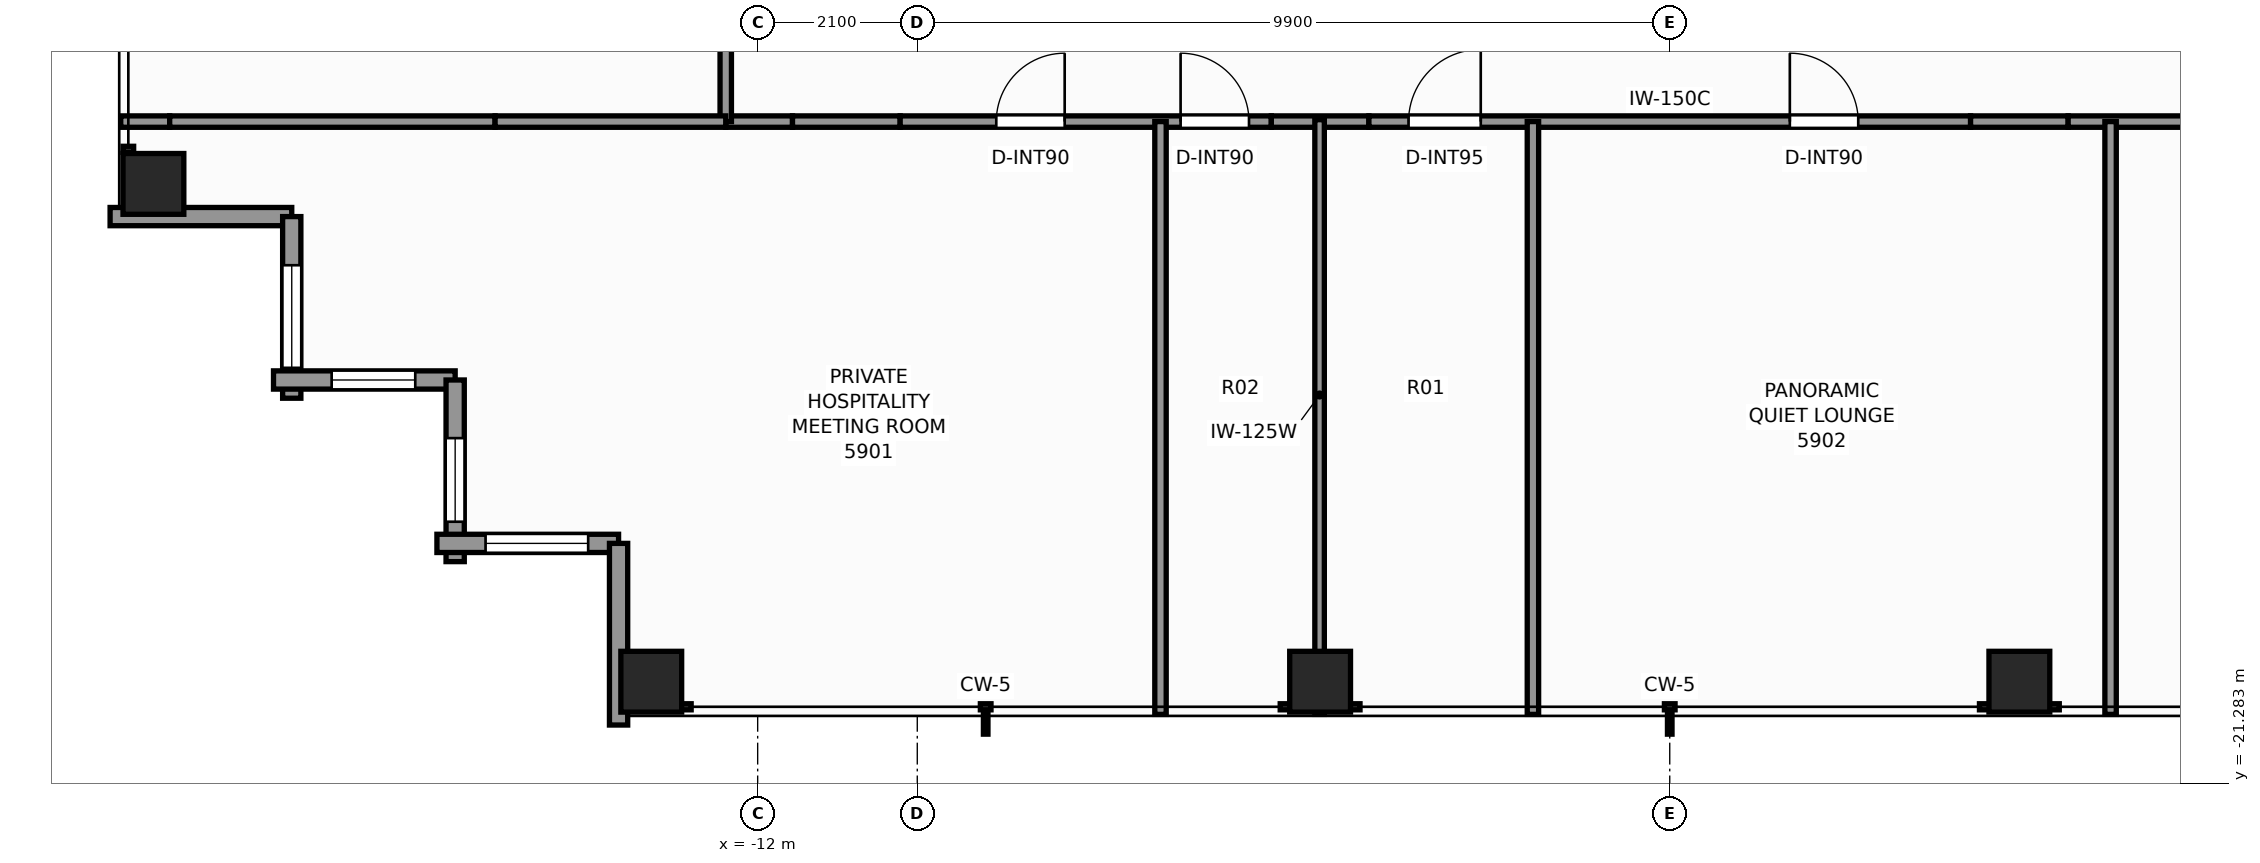
"""IFC4 building model, lengths in metres.
Left out: names, types, materials, properties, quantities, classifications, styles, units other than length and angle.
Written with IfcOpenShell. Run it as: python <this file> out.ifc"""

import sys

from ifc_helpers import new_model, si_unit, direction, frame, frame_2d, origin, origin_2d, place, context, subcontext, project, spatial, rectangle, extrude, element, fill, save


model = new_model("IFC4")
c1 = context("Model", 3, precision=1e-05, world=origin(), true_north=direction((0.0, 1.0)))
c2 = subcontext(c1, "Body", "Model", "MODEL_VIEW")
j1 = project(units=[si_unit("LENGTHUNIT", "METRE"), si_unit("PLANEANGLEUNIT", "RADIAN")], contexts=[c1])
p1 = place(None, origin())
s1 = spatial("IfcSite", under=j1, at=p1, CompositionType="ELEMENT")
p2 = place(p1, origin())
s2 = spatial("IfcBuilding", under=s1, at=p2, CompositionType="ELEMENT")
p3 = place(p2, frame((0.0, 0.0, 203.1)))
s3 = spatial("IfcBuildingStorey", under=s2, at=p3, CompositionType="ELEMENT", Elevation=203.1)
for number, where, z_axis, x_axis in (
    (1, (-13.4, -19.95, 0.0), (0.0, 0.0, 1.0), (1.0, 0.0, 0.0)),
    (2, (-4.6, -19.95, 0.0), (0.0, 0.0, 1.0), (1.0, 0.0, 0.0)),
    (3, (4.6, -19.95, 0.0), (0.0, 0.0, 1.0), (1.0, 0.0, 0.0)),
    (4, (-19.95, -13.4, 0.0), (0.0, 0.0, 1.0), (1.0, 0.0, 0.0)),
):
    element("IfcColumn", number, at=place(p3, frame(where, z_axis=z_axis, x_axis=x_axis)), inside=s3, PredefinedType="COLUMN", context=c2, shape_type="SweptSolid", body=[
        extrude(rectangle(XDim=0.8, YDim=0.8, at=origin_2d()), origin(), (0.0, 0.0, 1.0), 3.3),
    ])
p4 = place(p3, frame((-18.13, -13.83, 0.0), z_axis=(0.0, 0.0, 1.0), x_axis=(-1.0, 0.0, 0.0)))
e5 = element("IfcWall", 5, at=p4, inside=s3, PredefinedType="STANDARD", context=c2, shape_type="SweptSolid", body=[
    extrude(rectangle(XDim=2.39, YDim=0.24, at=frame_2d((1.195, 0.0))), origin(), (0.0, 0.0, 1.0), 1.275),
])
p5 = place(p3, frame((-18.13, -16.22, 0.0), z_axis=(0.0, 0.0, 1.0), x_axis=(0.0, 1.0, 0.0)))
e6 = element("IfcWall", 6, at=p5, inside=s3, PredefinedType="STANDARD", context=c2, shape_type="SweptSolid", body=[
    extrude(rectangle(XDim=2.39, YDim=0.24, at=frame_2d((1.195, 0.0))), origin(), (0.0, 0.0, 1.0), 2.463),
])
p6 = place(p5, frame((0.4, 0.0, 0.65)))
e7 = element("IfcOpeningElement", 7, at=p6, cuts=e6, PredefinedType="OPENING", context=c2, shape_type="SweptSolid", body=[
    extrude(rectangle(XDim=1.35, YDim=1.55, at=frame_2d((0.675, 0.775))), frame((0.0, 0.13, 0.0), z_axis=(0.0, -1.0, 0.0), x_axis=(1.0, 0.0, 0.0)), (0.0, 0.0, 1.0), 0.26),
])
p7 = place(p3, frame((-15.98, -15.98, 0.0), z_axis=(0.0, 0.0, 1.0), x_axis=(-1.0, 0.0, 0.0)))
e8 = element("IfcWall", 8, at=p7, inside=s3, PredefinedType="STANDARD", context=c2, shape_type="SweptSolid", body=[
    extrude(rectangle(XDim=2.39, YDim=0.24, at=frame_2d((1.195, 0.0))), origin(), (0.0, 0.0, 1.0), 2.463),
])
p8 = place(p7, frame((0.525, 0.0, 0.65)))
e9 = element("IfcOpeningElement", 9, at=p8, cuts=e8, PredefinedType="OPENING", context=c2, shape_type="SweptSolid", body=[
    extrude(rectangle(XDim=1.1, YDim=1.45, at=frame_2d((0.55, 0.725))), frame((0.0, 0.13, 0.0), z_axis=(0.0, -1.0, 0.0), x_axis=(1.0, 0.0, 0.0)), (0.0, 0.0, 1.0), 0.26),
])
p9 = place(p3, frame((-15.98, -18.37, 0.0), z_axis=(0.0, 0.0, 1.0), x_axis=(0.0, 1.0, 0.0)))
e10 = element("IfcWall", 10, at=p9, inside=s3, PredefinedType="STANDARD", context=c2, shape_type="SweptSolid", body=[
    extrude(rectangle(XDim=2.39, YDim=0.24, at=frame_2d((1.195, 0.0))), origin(), (0.0, 0.0, 1.0), 2.463),
])
p10 = place(p9, frame((0.525, 0.0, 0.65)))
e11 = element("IfcOpeningElement", 11, at=p10, cuts=e10, PredefinedType="OPENING", context=c2, shape_type="SweptSolid", body=[
    extrude(rectangle(XDim=1.1, YDim=1.45, at=frame_2d((0.55, 0.725))), frame((0.0, 0.13, 0.0), z_axis=(0.0, -1.0, 0.0), x_axis=(1.0, 0.0, 0.0)), (0.0, 0.0, 1.0), 0.26),
])
p11 = place(p3, frame((-13.83, -18.13, 0.0), z_axis=(0.0, 0.0, 1.0), x_axis=(-1.0, 0.0, 0.0)))
e12 = element("IfcWall", 12, at=p11, inside=s3, PredefinedType="STANDARD", context=c2, shape_type="SweptSolid", body=[
    extrude(rectangle(XDim=2.39, YDim=0.24, at=frame_2d((1.195, 0.0))), origin(), (0.0, 0.0, 1.0), 2.463),
])
p12 = place(p11, frame((0.4, 0.0, 0.65)))
e13 = element("IfcOpeningElement", 13, at=p12, cuts=e12, PredefinedType="OPENING", context=c2, shape_type="SweptSolid", body=[
    extrude(rectangle(XDim=1.35, YDim=1.55, at=frame_2d((0.675, 0.775))), frame((0.0, 0.13, 0.0), z_axis=(0.0, -1.0, 0.0), x_axis=(1.0, 0.0, 0.0)), (0.0, 0.0, 1.0), 0.26),
])
p13 = place(p3, frame((-13.83, -20.52, 0.0), z_axis=(0.0, 0.0, 1.0), x_axis=(0.0, 1.0, 0.0)))
e14 = element("IfcWall", 14, at=p13, inside=s3, PredefinedType="STANDARD", context=c2, shape_type="SweptSolid", body=[
    extrude(rectangle(XDim=2.39, YDim=0.24, at=frame_2d((1.195, 0.0))), origin(), (0.0, 0.0, 1.0), 1.275),
])
p14 = place(p3, frame((-12.42, -12.58, 0.0), z_axis=(0.0, 0.0, 1.0), x_axis=(1.0, 0.0, 0.0)))
e15 = element("IfcWall", 15, at=p14, inside=s3, PredefinedType="PARTITIONING", context=c2, shape_type="SweptSolid", body=[
    extrude(rectangle(XDim=0.878, YDim=0.15, at=frame_2d((0.439, 0.0))), origin(), (0.0, 0.0, 1.0), 3.08),
])
p15 = place(p3, frame((-11.542, -12.58, 0.0), z_axis=(0.0, 0.0, 1.0), x_axis=(1.0, 0.0, 0.0)))
e16 = element("IfcWall", 16, at=p15, inside=s3, PredefinedType="PARTITIONING", context=c2, shape_type="SweptSolid", body=[
    extrude(rectangle(XDim=1.417, YDim=0.15, at=frame_2d((0.708, 0.0))), origin(), (0.0, 0.0, 1.0), 1.265),
])
p16 = place(p3, frame((-10.125, -12.58, 0.0), z_axis=(0.0, 0.0, 1.0), x_axis=(1.0, 0.0, 0.0)))
e17 = element("IfcWall", 17, at=p16, inside=s3, PredefinedType="PARTITIONING", context=c2, shape_type="SweptSolid", body=[
    extrude(rectangle(XDim=4.883, YDim=0.15, at=frame_2d((2.441, 0.0))), origin(), (0.0, 0.0, 1.0), 3.08),
])
p17 = place(p16, frame((1.264, 0.0, 0.0)))
e18 = element("IfcOpeningElement", 18, at=p17, cuts=e17, PredefinedType="OPENING", context=c2, shape_type="SweptSolid", body=[
    extrude(rectangle(XDim=0.9, YDim=2.06, at=frame_2d((0.45, 1.03))), frame((0.0, 0.085, 0.0), z_axis=(0.0, -1.0, 0.0), x_axis=(1.0, 0.0, 0.0)), (0.0, 0.0, 1.0), 0.17),
])
p18 = place(p16, frame((3.689, 0.0, 0.0)))
e19 = element("IfcOpeningElement", 19, at=p18, cuts=e17, PredefinedType="OPENING", context=c2, shape_type="SweptSolid", body=[
    extrude(rectangle(XDim=0.9, YDim=2.06, at=frame_2d((0.45, 1.03))), frame((0.0, 0.085, 0.0), z_axis=(0.0, -1.0, 0.0), x_axis=(1.0, 0.0, 0.0)), (0.0, 0.0, 1.0), 0.17),
])
p19 = place(p3, frame((-5.242, -12.58, 0.0), z_axis=(0.0, 0.0, 1.0), x_axis=(1.0, 0.0, 0.0)))
e20 = element("IfcWall", 20, at=p19, inside=s3, PredefinedType="PARTITIONING", context=c2, shape_type="SweptSolid", body=[
    extrude(rectangle(XDim=1.284, YDim=0.15, at=frame_2d((0.642, 0.0))), origin(), (0.0, 0.0, 1.0), 1.265),
])
p20 = place(p3, frame((-3.958, -12.58, 0.0), z_axis=(0.0, 0.0, 1.0), x_axis=(1.0, 0.0, 0.0)))
e21 = element("IfcWall", 21, at=p20, inside=s3, PredefinedType="PARTITIONING", context=c2, shape_type="SweptSolid", body=[
    extrude(rectangle(XDim=7.916, YDim=0.15, at=frame_2d((3.958, 0.0))), origin(), (0.0, 0.0, 1.0), 2.369),
])
p21 = place(p20, frame((0.521, 0.0, 0.0)))
e22 = element("IfcOpeningElement", 22, at=p21, cuts=e21, PredefinedType="OPENING", context=c2, shape_type="SweptSolid", body=[
    extrude(rectangle(XDim=0.95, YDim=2.06, at=frame_2d((0.475, 1.03))), frame((0.0, 0.085, 0.0), z_axis=(0.0, -1.0, 0.0), x_axis=(1.0, 0.0, 0.0)), (0.0, 0.0, 1.0), 0.17),
])
p22 = place(p20, frame((5.538, 0.0, 0.0)))
e23 = element("IfcOpeningElement", 23, at=p22, cuts=e21, PredefinedType="OPENING", context=c2, shape_type="SweptSolid", body=[
    extrude(rectangle(XDim=0.9, YDim=2.06, at=frame_2d((0.45, 1.03))), frame((0.0, 0.085, 0.0), z_axis=(0.0, -1.0, 0.0), x_axis=(1.0, 0.0, 0.0)), (0.0, 0.0, 1.0), 0.17),
])
p23 = place(p3, frame((3.958, -12.58, 0.0), z_axis=(0.0, 0.0, 1.0), x_axis=(1.0, 0.0, 0.0)))
e24 = element("IfcWall", 24, at=p23, inside=s3, PredefinedType="PARTITIONING", context=c2, shape_type="SweptSolid", body=[
    extrude(rectangle(XDim=1.284, YDim=0.15, at=frame_2d((0.642, 0.0))), origin(), (0.0, 0.0, 1.0), 1.265),
])
p24 = place(p3, frame((5.242, -12.58, 0.0), z_axis=(0.0, 0.0, 1.0), x_axis=(1.0, 0.0, 0.0)))
e25 = element("IfcWall", 25, at=p24, inside=s3, PredefinedType="PARTITIONING", context=c2, shape_type="SweptSolid", body=[
    extrude(rectangle(XDim=4.883, YDim=0.15, at=frame_2d((2.441, 0.0))), origin(), (0.0, 0.0, 1.0), 3.08),
])
p25 = place(p24, frame((2.017, 0.0, 0.0)))
e26 = element("IfcOpeningElement", 26, at=p25, cuts=e25, PredefinedType="OPENING", context=c2, shape_type="SweptSolid", body=[
    extrude(rectangle(XDim=0.9, YDim=2.06, at=frame_2d((0.45, 1.03))), frame((0.0, 0.085, 0.0), z_axis=(0.0, -1.0, 0.0), x_axis=(1.0, 0.0, 0.0)), (0.0, 0.0, 1.0), 0.17),
])
p26 = place(p3, frame((-12.42, -12.58, 0.0), z_axis=(0.0, 0.0, 1.0), x_axis=(0.0, 1.0, 0.0)))
e27 = element("IfcWall", 27, at=p26, inside=s3, PredefinedType="PARTITIONING", context=c2, shape_type="SweptSolid", body=[
    extrude(rectangle(XDim=1.094, YDim=0.15, at=frame_2d((0.547, 0.0))), origin(), (0.0, 0.0, 1.0), 3.08),
])
p27 = place(p3, frame((-20.38, -12.58, 0.0), z_axis=(0.0, 0.0, 1.0), x_axis=(1.0, 0.0, 0.0)))
e28 = element("IfcWall", 28, at=p27, inside=s3, PredefinedType="PARTITIONING", context=c2, shape_type="SweptSolid", body=[
    extrude(rectangle(XDim=0.644, YDim=0.15, at=frame_2d((0.322, 0.0))), origin(), (0.0, 0.0, 1.0), 2.453),
])
p28 = place(p3, frame((-19.736, -12.58, 0.0), z_axis=(0.0, 0.0, 1.0), x_axis=(1.0, 0.0, 0.0)))
e29 = element("IfcWall", 29, at=p28, inside=s3, PredefinedType="PARTITIONING", context=c2, shape_type="SweptSolid", body=[
    extrude(rectangle(XDim=4.281, YDim=0.15, at=frame_2d((2.141, 0.0))), origin(), (0.0, 0.0, 1.0), 1.265),
])
p29 = place(p3, frame((-15.455, -12.58, 0.0), z_axis=(0.0, 0.0, 1.0), x_axis=(1.0, 0.0, 0.0)))
e30 = element("IfcWall", 30, at=p29, inside=s3, PredefinedType="PARTITIONING", context=c2, shape_type="SweptSolid", body=[
    extrude(rectangle(XDim=3.035, YDim=0.15, at=frame_2d((1.517, 0.0))), origin(), (0.0, 0.0, 1.0), 3.08),
])
for number, where, z_axis, x_axis in (
    (31, (-6.7, -20.38, 0.0), (0.0, 0.0, 1.0), (0.0, 1.0, 0.0)),
    (32, (-1.8, -20.38, 0.0), (0.0, 0.0, 1.0), (0.0, 1.0, 0.0)),
):
    element("IfcWall", number, at=place(p3, frame(where, z_axis=z_axis, x_axis=x_axis)), inside=s3, PredefinedType="PARTITIONING", context=c2, shape_type="SweptSolid", body=[
        extrude(rectangle(XDim=7.8, YDim=0.15, at=frame_2d((3.9, 0.0))), origin(), (0.0, 0.0, 1.0), 2.453),
    ])
p30 = place(p3, frame((-4.607, -20.38, 0.0), z_axis=(0.0, 0.0, 1.0), x_axis=(0.0, 1.0, 0.0)))
e33 = element("IfcWall", 33, at=p30, inside=s3, PredefinedType="PARTITIONING", context=c2, shape_type="SweptSolid", body=[
    extrude(rectangle(XDim=0.58, YDim=0.125, at=frame_2d((0.29, 0.0))), origin(), (0.0, 0.0, 1.0), 1.779),
])
p31 = place(p3, frame((-4.607, -19.8, 0.0), z_axis=(0.0, 0.0, 1.0), x_axis=(0.0, 1.0, 0.0)))
e34 = element("IfcWall", 34, at=p31, inside=s3, PredefinedType="PARTITIONING", context=c2, shape_type="SweptSolid", body=[
    extrude(rectangle(XDim=7.245, YDim=0.125, at=frame_2d((3.623, 0.0))), origin(), (0.0, 0.0, 1.0), 1.265),
])
p32 = place(p3, frame((5.8, -20.38, 0.0), z_axis=(0.0, 0.0, 1.0), x_axis=(0.0, 1.0, 0.0)))
e35 = element("IfcWall", 35, at=p32, inside=s3, PredefinedType="PARTITIONING", context=c2, shape_type="SweptSolid", body=[
    extrude(rectangle(XDim=7.8, YDim=0.15, at=frame_2d((3.9, 0.0))), origin(), (0.0, 0.0, 1.0), 2.453),
])
p33 = place(p6, origin())
e36 = element("IfcWindow", 36, at=p33, inside=s3, PartitioningType="SINGLE_PANEL", PredefinedType="WINDOW", context=c2, shape_type="SweptSolid", body=[
    extrude(rectangle(XDim=1.35, YDim=1.55, at=frame_2d((0.675, 0.775))), frame((0.0, 0.03, 0.0), z_axis=(0.0, -1.0, 0.0), x_axis=(1.0, 0.0, 0.0)), (0.0, 0.0, 1.0), 0.06),
])
fill(e7, e36)
p34 = place(p8, origin())
e37 = element("IfcWindow", 37, at=p34, inside=s3, PartitioningType="SINGLE_PANEL", PredefinedType="WINDOW", context=c2, shape_type="SweptSolid", body=[
    extrude(rectangle(XDim=1.1, YDim=1.45, at=frame_2d((0.55, 0.725))), frame((0.0, 0.03, 0.0), z_axis=(0.0, -1.0, 0.0), x_axis=(1.0, 0.0, 0.0)), (0.0, 0.0, 1.0), 0.06),
])
fill(e9, e37)
p35 = place(p10, origin())
e38 = element("IfcWindow", 38, at=p35, inside=s3, PartitioningType="SINGLE_PANEL", PredefinedType="WINDOW", context=c2, shape_type="SweptSolid", body=[
    extrude(rectangle(XDim=1.1, YDim=1.45, at=frame_2d((0.55, 0.725))), frame((0.0, 0.03, 0.0), z_axis=(0.0, -1.0, 0.0), x_axis=(1.0, 0.0, 0.0)), (0.0, 0.0, 1.0), 0.06),
])
fill(e11, e38)
p36 = place(p12, origin())
e39 = element("IfcWindow", 39, at=p36, inside=s3, PartitioningType="SINGLE_PANEL", PredefinedType="WINDOW", context=c2, shape_type="SweptSolid", body=[
    extrude(rectangle(XDim=1.35, YDim=1.55, at=frame_2d((0.675, 0.775))), frame((0.0, 0.03, 0.0), z_axis=(0.0, -1.0, 0.0), x_axis=(1.0, 0.0, 0.0)), (0.0, 0.0, 1.0), 0.06),
])
fill(e13, e39)
p37 = place(p17, origin())
e40 = element("IfcDoor", 40, at=p37, inside=s3, OperationType="SINGLE_SWING_RIGHT", PredefinedType="DOOR", context=c2, shape_type="SweptSolid", body=[
    extrude(rectangle(XDim=0.9, YDim=2.06, at=frame_2d((0.45, 1.03))), frame((0.0, 0.025, 0.0), z_axis=(0.0, -1.0, 0.0), x_axis=(1.0, 0.0, 0.0)), (0.0, 0.0, 1.0), 0.05),
])
fill(e18, e40)
p38 = place(p18, origin())
e41 = element("IfcDoor", 41, at=p38, inside=s3, OperationType="SINGLE_SWING_LEFT", PredefinedType="DOOR", context=c2, shape_type="SweptSolid", body=[
    extrude(rectangle(XDim=0.9, YDim=2.06, at=frame_2d((0.45, 1.03))), frame((0.0, 0.025, 0.0), z_axis=(0.0, -1.0, 0.0), x_axis=(1.0, 0.0, 0.0)), (0.0, 0.0, 1.0), 0.05),
])
fill(e19, e41)
p39 = place(p21, origin())
e42 = element("IfcDoor", 42, at=p39, inside=s3, OperationType="SINGLE_SWING_RIGHT", PredefinedType="DOOR", context=c2, shape_type="SweptSolid", body=[
    extrude(rectangle(XDim=0.95, YDim=2.06, at=frame_2d((0.475, 1.03))), frame((0.0, 0.025, 0.0), z_axis=(0.0, -1.0, 0.0), x_axis=(1.0, 0.0, 0.0)), (0.0, 0.0, 1.0), 0.05),
])
fill(e22, e42)
p40 = place(p22, origin())
e43 = element("IfcDoor", 43, at=p40, inside=s3, OperationType="SINGLE_SWING_LEFT", PredefinedType="DOOR", context=c2, shape_type="SweptSolid", body=[
    extrude(rectangle(XDim=0.9, YDim=2.06, at=frame_2d((0.45, 1.03))), frame((0.0, 0.025, 0.0), z_axis=(0.0, -1.0, 0.0), x_axis=(1.0, 0.0, 0.0)), (0.0, 0.0, 1.0), 0.05),
])
fill(e23, e43)
save(model, sys.argv[1])
